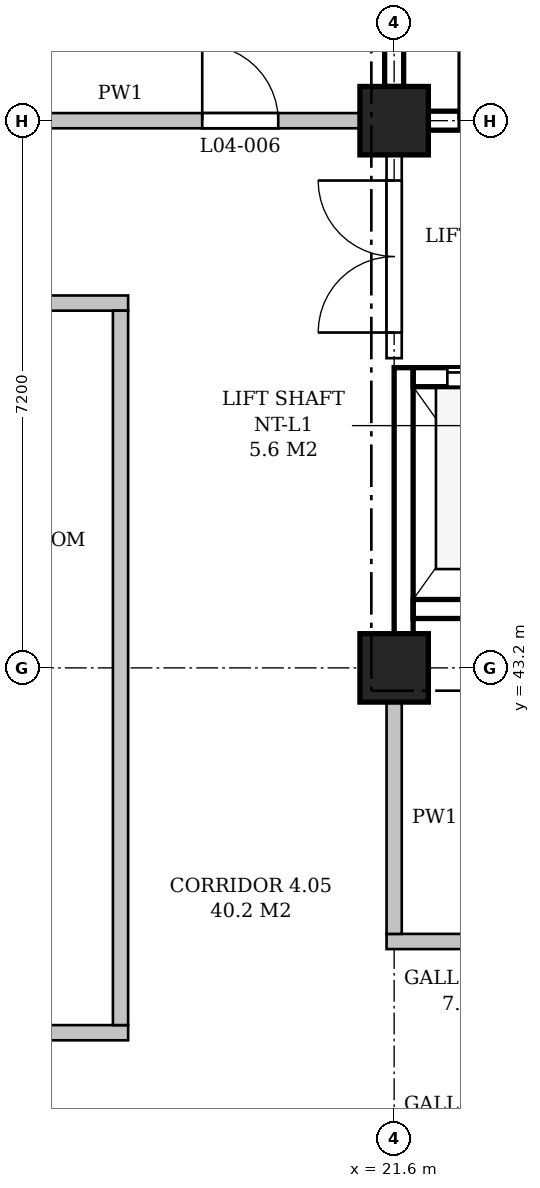
"""IFC4 building model, lengths in metres.
Left out: names, types, materials, properties, quantities, classifications, styles, units other than length and angle.
Written with IfcOpenShell. Run it as: python <this file> out.ifc"""

import sys

from ifc_helpers import new_model, si_unit, direction, frame, frame_2d, origin, origin_2d, place, context, subcontext, project, spatial, polyline, rectangle, outline, extrude, element, fill, save


model = new_model("IFC4")
c1 = context("Model", 3, precision=1e-05, world=origin(), true_north=direction((0.0, 1.0)))
c2 = subcontext(c1, "Body", "Model", "MODEL_VIEW")
j1 = project(units=[si_unit("LENGTHUNIT", "METRE"), si_unit("PLANEANGLEUNIT", "RADIAN")], contexts=[c1])
p1 = place(None, origin())
s1 = spatial("IfcSite", under=j1, at=p1, CompositionType="ELEMENT")
p2 = place(p1, origin())
s2 = spatial("IfcBuilding", under=s1, at=p2, CompositionType="ELEMENT")
p3 = place(p2, frame((0.0, 0.0, 21.6)))
s3 = spatial("IfcBuildingStorey", under=s2, at=p3, CompositionType="ELEMENT", Elevation=21.6)
for number, where, z_axis, x_axis in (
    (1, (21.6, 43.2, 0.0), (0.0, 0.0, 1.0), (1.0, 0.0, 0.0)),
    (2, (21.6, 50.4, 0.0), (0.0, 0.0, 1.0), (1.0, 0.0, 0.0)),
):
    element("IfcColumn", number, at=place(p3, frame(where, z_axis=z_axis, x_axis=x_axis)), inside=s3, PredefinedType="COLUMN", context=c2, shape_type="SweptSolid", body=[
        extrude(rectangle(XDim=0.9, YDim=0.9, at=origin_2d()), origin(), (0.0, 0.0, 1.0), 4.8),
    ])
p4 = place(p3, frame((22.05, 50.4, 0.0), z_axis=(0.0, 0.0, 1.0), x_axis=(1.0, 0.0, 0.0)))
e3 = element("IfcWall", 3, at=p4, inside=s3, PredefinedType="SHEAR", context=c2, shape_type="SweptSolid", body=[
    extrude(rectangle(XDim=6.3, YDim=0.25, at=frame_2d((3.15, 0.0))), origin(), (0.0, 0.0, 1.0), 3.8),
])
p5 = place(p4, frame((0.4, 0.0, 0.0)))
e4 = element("IfcOpeningElement", 4, at=p5, cuts=e3, PredefinedType="OPENING", context=c2, shape_type="SweptSolid", body=[
    extrude(rectangle(XDim=1.1, YDim=2.1, at=frame_2d((0.55, 1.05))), frame((0.0, 0.135, 0.0), z_axis=(0.0, -1.0, 0.0), x_axis=(1.0, 0.0, 0.0)), (0.0, 0.0, 1.0), 0.27),
])
p6 = place(p3, frame((21.6, 50.85, 0.0), z_axis=(0.0, 0.0, 1.0), x_axis=(0.0, 1.0, 0.0)))
e5 = element("IfcWall", 5, at=p6, inside=s3, PredefinedType="SHEAR", context=c2, shape_type="SweptSolid", body=[
    extrude(rectangle(XDim=6.3, YDim=0.25, at=frame_2d((3.15, 0.0))), origin(), (0.0, 0.0, 1.0), 3.8),
])
p7 = place(p3, frame((21.725, 43.65, -0.25), z_axis=(0.0, 0.0, 1.0), x_axis=(0.0, 1.0, 0.0)))
e6 = element("IfcWall", 6, at=p7, inside=s3, PredefinedType="SHEAR", context=c2, shape_type="SweptSolid", body=[
    extrude(rectangle(XDim=3.5, YDim=0.25, at=frame_2d((1.75, 0.0))), origin(), (0.0, 0.0, 1.0), 4.05),
])
p8 = place(p3, frame((21.85, 47.025, -0.25), z_axis=(0.0, 0.0, 1.0), x_axis=(1.0, 0.0, 0.0)))
e7 = element("IfcWall", 7, at=p8, inside=s3, PredefinedType="SHEAR", context=c2, shape_type="SweptSolid", body=[
    extrude(rectangle(XDim=2.0, YDim=0.25, at=frame_2d((1.0, 0.0))), origin(), (0.0, 0.0, 1.0), 4.8),
])
p9 = place(p8, frame((0.45, 0.0, 0.25)))
e8 = element("IfcOpeningElement", 8, at=p9, cuts=e7, PredefinedType="OPENING", context=c2, shape_type="SweptSolid", body=[
    extrude(rectangle(XDim=1.1, YDim=2.1, at=frame_2d((0.55, 1.05))), frame((0.0, 0.135, 0.0), z_axis=(0.0, -1.0, 0.0), x_axis=(1.0, 0.0, 0.0)), (0.0, 0.0, 1.0), 0.27),
])
p10 = place(p3, frame((21.85, 43.975, -0.25), z_axis=(0.0, 0.0, 1.0), x_axis=(1.0, 0.0, 0.0)))
e9 = element("IfcWall", 9, at=p10, inside=s3, PredefinedType="SHEAR", context=c2, shape_type="SweptSolid", body=[
    extrude(rectangle(XDim=2.0, YDim=0.25, at=frame_2d((1.0, 0.0))), origin(), (0.0, 0.0, 1.0), 4.8),
])
p11 = place(p3, frame((3.5, 38.4, 0.0), z_axis=(0.0, 0.0, 1.0), x_axis=(1.0, 0.0, 0.0)))
e10 = element("IfcWall", 10, at=p11, inside=s3, PredefinedType="PARTITIONING", context=c2, shape_type="SweptSolid", body=[
    extrude(outline(polyline([(0.0, 0.0), (14.6, 0.0), (14.6, 4.55), (11.15, 4.55), (11.15, 3.8), (10.65, 3.8), (10.65, 4.55), (3.95, 4.55), (3.95, 3.8), (3.45, 3.8), (3.45, 4.55), (0.0, 4.55), (0.0, 0.0)])), frame((0.0, 0.1, 0.0), z_axis=(0.0, -1.0, 0.0), x_axis=(1.0, 0.0, 0.0)), (0.0, 0.0, 1.0), 0.2),
])
p12 = place(p3, frame((21.5, 39.6, 0.0), z_axis=(0.0, 0.0, 1.0), x_axis=(1.0, 0.0, 0.0)))
e11 = element("IfcWall", 11, at=p12, inside=s3, PredefinedType="PARTITIONING", context=c2, shape_type="SweptSolid", body=[
    extrude(outline(polyline([(0.0, 0.0), (7.15, 0.0), (7.15, 3.95), (7.05, 3.95), (7.05, 4.55), (0.35, 4.55), (0.35, 3.8), (0.0, 3.8), (0.0, 0.0)])), frame((0.0, 0.1, 0.0), z_axis=(0.0, -1.0, 0.0), x_axis=(1.0, 0.0, 0.0)), (0.0, 0.0, 1.0), 0.2),
])
p13 = place(p12, frame((3.125, 0.0, 0.0)))
e12 = element("IfcOpeningElement", 12, at=p13, cuts=e11, PredefinedType="OPENING", context=c2, shape_type="SweptSolid", body=[
    extrude(rectangle(XDim=1.0, YDim=2.1, at=frame_2d((0.5, 1.05))), frame((0.0, 0.11, 0.0), z_axis=(0.0, -1.0, 0.0), x_axis=(1.0, 0.0, 0.0)), (0.0, 0.0, 1.0), 0.22),
])
p14 = place(p3, frame((3.5, 48.0, 0.0), z_axis=(0.0, 0.0, 1.0), x_axis=(1.0, 0.0, 0.0)))
e13 = element("IfcWall", 13, at=p14, inside=s3, PredefinedType="PARTITIONING", context=c2, shape_type="SweptSolid", body=[
    extrude(outline(polyline([(0.0, 0.0), (14.6, 0.0), (14.6, 4.55), (11.15, 4.55), (11.15, 3.8), (10.65, 3.8), (10.65, 4.55), (3.95, 4.55), (3.95, 3.8), (3.45, 3.8), (3.45, 4.55), (0.0, 4.55), (0.0, 0.0)])), frame((0.0, 0.1, 0.0), z_axis=(0.0, -1.0, 0.0), x_axis=(1.0, 0.0, 0.0)), (0.0, 0.0, 1.0), 0.2),
])
p15 = place(p14, frame((5.0, 0.0, 0.0)))
e14 = element("IfcOpeningElement", 14, at=p15, cuts=e13, PredefinedType="OPENING", context=c2, shape_type="SweptSolid", body=[
    extrude(rectangle(XDim=1.0, YDim=2.1, at=frame_2d((0.5, 1.05))), frame((0.0, 0.11, 0.0), z_axis=(0.0, -1.0, 0.0), x_axis=(1.0, 0.0, 0.0)), (0.0, 0.0, 1.0), 0.22),
])
p16 = place(p14, frame((8.6, 0.0, 0.0)))
e15 = element("IfcOpeningElement", 15, at=p16, cuts=e13, PredefinedType="OPENING", context=c2, shape_type="SweptSolid", body=[
    extrude(rectangle(XDim=1.0, YDim=2.1, at=frame_2d((0.5, 1.05))), frame((0.0, 0.11, 0.0), z_axis=(0.0, -1.0, 0.0), x_axis=(1.0, 0.0, 0.0)), (0.0, 0.0, 1.0), 0.22),
])
p17 = place(p3, frame((14.85, 50.4, 0.0), z_axis=(0.0, 0.0, 1.0), x_axis=(1.0, 0.0, 0.0)))
e16 = element("IfcWall", 16, at=p17, inside=s3, PredefinedType="PARTITIONING", context=c2, shape_type="SweptSolid", body=[
    extrude(rectangle(XDim=6.3, YDim=0.2, at=frame_2d((3.15, 0.0))), origin(), (0.0, 0.0, 1.0), 3.8),
])
p18 = place(p17, frame((4.225, 0.0, 0.0)))
e17 = element("IfcOpeningElement", 17, at=p18, cuts=e16, PredefinedType="OPENING", context=c2, shape_type="SweptSolid", body=[
    extrude(rectangle(XDim=1.0, YDim=2.1, at=frame_2d((0.5, 1.05))), frame((0.0, 0.11, 0.0), z_axis=(0.0, -1.0, 0.0), x_axis=(1.0, 0.0, 0.0)), (0.0, 0.0, 1.0), 0.22),
])
p19 = place(p3, frame((18.0, 38.5, 0.0), z_axis=(0.0, 0.0, 1.0), x_axis=(0.0, 1.0, 0.0)))
e18 = element("IfcWall", 18, at=p19, inside=s3, PredefinedType="PARTITIONING", context=c2, shape_type="SweptSolid", body=[
    extrude(outline(polyline([(0.0, 0.0), (9.4, 0.0), (9.4, 4.55), (4.95, 4.55), (4.95, 3.8), (4.45, 3.8), (4.45, 4.55), (0.0, 4.55), (0.0, 0.0)])), frame((0.0, 0.1, 0.0), z_axis=(0.0, -1.0, 0.0), x_axis=(1.0, 0.0, 0.0)), (0.0, 0.0, 1.0), 0.2),
])
p20 = place(p3, frame((21.6, 39.7, 0.0), z_axis=(0.0, 0.0, 1.0), x_axis=(0.0, 1.0, 0.0)))
e19 = element("IfcWall", 19, at=p20, inside=s3, PredefinedType="PARTITIONING", context=c2, shape_type="SweptSolid", body=[
    extrude(rectangle(XDim=3.05, YDim=0.2, at=frame_2d((1.525, 0.0))), origin(), (0.0, 0.0, 1.0), 3.8),
])
p21 = place(p3, frame((21.6, 47.275, 0.0), z_axis=(0.0, 0.0, 1.0), x_axis=(0.0, 1.0, 0.0)))
e20 = element("IfcWall", 20, at=p21, inside=s3, PredefinedType="PARTITIONING", context=c2, shape_type="SweptSolid", body=[
    extrude(rectangle(XDim=2.675, YDim=0.2, at=frame_2d((1.337, 0.0))), origin(), (0.0, 0.0, 1.0), 3.8),
])
p22 = place(p21, frame((0.337, 0.0, 0.0)))
e21 = element("IfcOpeningElement", 21, at=p22, cuts=e20, PredefinedType="OPENING", context=c2, shape_type="SweptSolid", body=[
    extrude(rectangle(XDim=2.0, YDim=2.4, at=frame_2d((1.0, 1.2))), frame((0.0, 0.11, 0.0), z_axis=(0.0, -1.0, 0.0), x_axis=(1.0, 0.0, 0.0)), (0.0, 0.0, 1.0), 0.22),
])
p23 = place(p5, origin())
e22 = element("IfcDoor", 22, at=p23, inside=s3, OperationType="SINGLE_SWING_LEFT", PredefinedType="DOOR", context=c2, shape_type="SweptSolid", body=[
    extrude(rectangle(XDim=1.1, YDim=2.1, at=frame_2d((0.55, 1.05))), frame((0.0, 0.025, 0.0), z_axis=(0.0, -1.0, 0.0), x_axis=(1.0, 0.0, 0.0)), (0.0, 0.0, 1.0), 0.05),
])
fill(e4, e22)
p24 = place(p9, origin())
e23 = element("IfcDoor", 23, at=p24, inside=s3, OperationType="SLIDING_TO_LEFT", PredefinedType="DOOR", context=c2, shape_type="SweptSolid", body=[
    extrude(rectangle(XDim=1.1, YDim=2.1, at=frame_2d((0.55, 1.05))), frame((0.0, 0.025, 0.0), z_axis=(0.0, -1.0, 0.0), x_axis=(1.0, 0.0, 0.0)), (0.0, 0.0, 1.0), 0.05),
])
fill(e8, e23)
p25 = place(p22, origin())
e24 = element("IfcDoor", 24, at=p25, inside=s3, OperationType="DOUBLE_DOOR_SINGLE_SWING", PredefinedType="DOOR", context=c2, shape_type="SweptSolid", body=[
    extrude(rectangle(XDim=2.0, YDim=2.4, at=frame_2d((1.0, 1.2))), frame((0.0, 0.025, 0.0), z_axis=(0.0, -1.0, 0.0), x_axis=(1.0, 0.0, 0.0)), (0.0, 0.0, 1.0), 0.05),
])
fill(e21, e24)
p26 = place(p18, origin())
e25 = element("IfcDoor", 25, at=p26, inside=s3, OperationType="SINGLE_SWING_LEFT", PredefinedType="DOOR", context=c2, shape_type="SweptSolid", body=[
    extrude(rectangle(XDim=1.0, YDim=2.1, at=frame_2d((0.5, 1.05))), frame((0.0, 0.025, 0.0), z_axis=(0.0, -1.0, 0.0), x_axis=(1.0, 0.0, 0.0)), (0.0, 0.0, 1.0), 0.05),
])
fill(e17, e25)
save(model, sys.argv[1])
